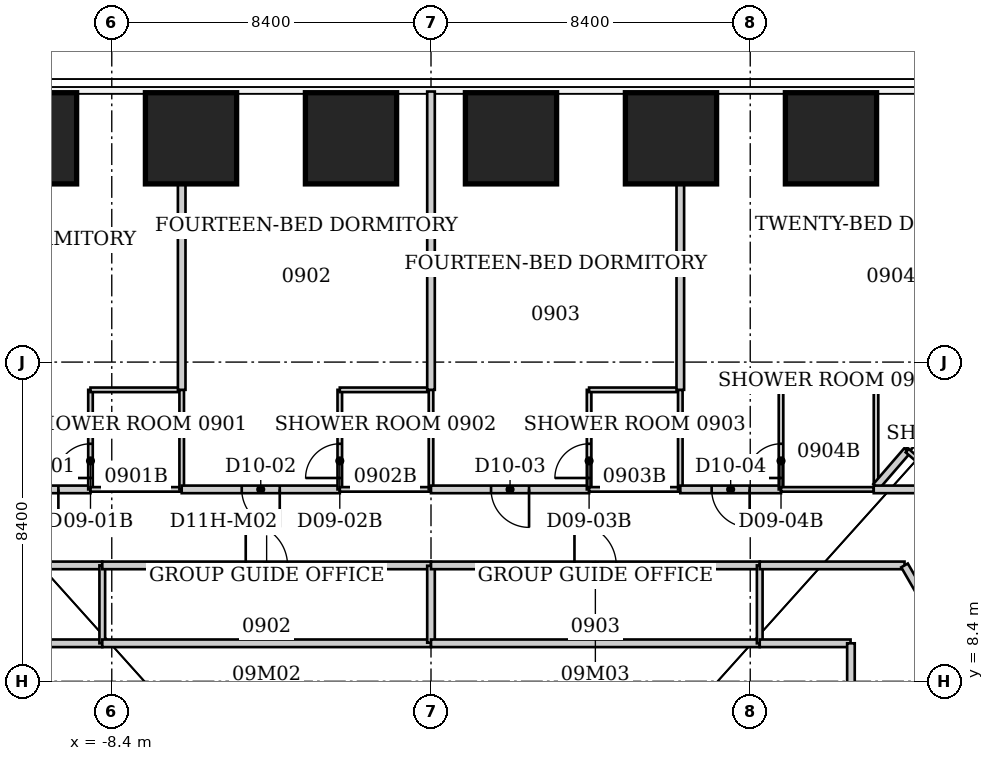
"""IFC4 building model, lengths in metres.
Left out: names, types, materials, properties, quantities, classifications, styles, units other than length and angle.
Written with IfcOpenShell. Run it as: python <this file> out.ifc"""

import sys

from ifc_helpers import new_model, si_unit, direction, frame, frame_2d, origin, origin_2d, place, context, subcontext, project, spatial, rectangle, extrude, element, fill, save


model = new_model("IFC4")
c1 = context("Model", 3, precision=1e-05, world=origin(), true_north=direction((0.0, 1.0)))
c2 = subcontext(c1, "Body", "Model", "MODEL_VIEW")
j1 = project(units=[si_unit("LENGTHUNIT", "METRE"), si_unit("PLANEANGLEUNIT", "RADIAN")], contexts=[c1])
p1 = place(None, origin())
s1 = spatial("IfcSite", under=j1, at=p1, CompositionType="ELEMENT")
p2 = place(p1, origin())
s2 = spatial("IfcBuilding", under=s1, at=p2, CompositionType="ELEMENT")
p3 = place(p2, frame((0.0, 0.0, 42.0)))
s3 = spatial("IfcBuildingStorey", under=s2, at=p3, CompositionType="ELEMENT", Elevation=42.0)
for number, where, z_axis, x_axis in (
    (1, (-10.525, 22.689, 0.0), (0.0, 0.0, 1.0), (0.0, 1.0, 0.0)),
    (2, (-6.315, 22.689, 0.0), (0.0, 0.0, 1.0), (0.0, 1.0, 0.0)),
    (3, (-2.105, 22.689, 0.0), (0.0, 0.0, 1.0), (0.0, 1.0, 0.0)),
    (4, (2.105, 22.689, 0.0), (0.0, 0.0, 1.0), (0.0, 1.0, 0.0)),
    (5, (6.315, 22.689, 0.0), (0.0, 0.0, 1.0), (0.0, 1.0, 0.0)),
    (6, (10.525, 22.689, 0.0), (0.0, 0.0, 1.0), (0.0, 1.0, 0.0)),
):
    element("IfcColumn", number, at=place(p3, frame(where, z_axis=z_axis, x_axis=x_axis)), inside=s3, PredefinedType="COLUMN", context=c2, shape_type="SweptSolid", body=[
        extrude(rectangle(XDim=2.4, YDim=2.4, at=origin_2d()), origin(), (0.0, 0.0, 1.0), 3.8),
    ])
p4 = place(p3, frame((-12.46, 11.45, 0.0), z_axis=(0.0, 0.0, 1.0), x_axis=(1.0, 0.0, 0.0)))
e7 = element("IfcWall", 7, at=p4, inside=s3, PredefinedType="PARTITIONING", context=c2, shape_type="SweptSolid", body=[
    extrude(rectangle(XDim=3.81, YDim=0.2, at=frame_2d((1.905, 0.0))), origin(), (0.0, 0.0, 1.0), 3.64),
])
p5 = place(p3, frame((-8.96, 13.45, 0.0), z_axis=(0.0, 0.0, 1.0), x_axis=(-1.0, 0.0, 0.0)))
e8 = element("IfcWall", 8, at=p5, inside=s3, PredefinedType="PARTITIONING", context=c2, shape_type="SweptSolid", body=[
    extrude(rectangle(XDim=2.69, YDim=0.2, at=frame_2d((1.345, 0.0))), origin(), (0.0, 0.0, 1.0), 3.64),
])
p6 = place(p5, frame((0.845, 0.0, 0.0)))
e9 = element("IfcOpeningElement", 9, at=p6, cuts=e8, PredefinedType="OPENING", context=c2, shape_type="SweptSolid", body=[
    extrude(rectangle(XDim=1.0, YDim=2.13, at=frame_2d((0.5, 1.065))), frame((0.0, 0.1, 0.0), z_axis=(0.0, -1.0, 0.0), x_axis=(1.0, 0.0, 0.0)), (0.0, 0.0, 1.0), 0.2),
])
p7 = place(p3, frame((-8.96, 16.07, 0.0), z_axis=(0.0, 0.0, 1.0), x_axis=(0.0, -1.0, 0.0)))
e10 = element("IfcWall", 10, at=p7, inside=s3, PredefinedType="PARTITIONING", context=c2, shape_type="SweptSolid", body=[
    extrude(rectangle(XDim=2.62, YDim=0.12, at=frame_2d((1.31, 0.0))), origin(), (0.0, 0.0, 1.0), 3.64),
])
p8 = place(p7, frame((1.42, 0.0, 0.0)))
e11 = element("IfcOpeningElement", 11, at=p8, cuts=e10, PredefinedType="OPENING", context=c2, shape_type="SweptSolid", body=[
    extrude(rectangle(XDim=0.9, YDim=2.03, at=frame_2d((0.45, 1.015))), frame((0.0, 0.06, 0.0), z_axis=(0.0, -1.0, 0.0), x_axis=(1.0, 0.0, 0.0)), (0.0, 0.0, 1.0), 0.12),
])
p9 = place(p3, frame((-8.65, 9.4, 0.0), z_axis=(0.0, 0.0, 1.0), x_axis=(-1.0, 0.0, 0.0)))
e12 = element("IfcWall", 12, at=p9, inside=s3, PredefinedType="PARTITIONING", context=c2, shape_type="SweptSolid", body=[
    extrude(rectangle(XDim=2.39, YDim=0.2, at=frame_2d((1.195, 0.0))), origin(), (0.0, 0.0, 1.0), 3.64),
])
p10 = place(p3, frame((-8.65, 11.45, 0.0), z_axis=(0.0, 0.0, 1.0), x_axis=(0.0, -1.0, 0.0)))
e13 = element("IfcWall", 13, at=p10, inside=s3, PredefinedType="PARTITIONING", context=c2, shape_type="SweptSolid", body=[
    extrude(rectangle(XDim=2.05, YDim=0.15, at=frame_2d((1.025, 0.0))), origin(), (0.0, 0.0, 1.0), 3.64),
])
p11 = place(p3, frame((-8.65, 11.45, 0.0), z_axis=(0.0, 0.0, 1.0), x_axis=(1.0, 0.0, 0.0)))
e14 = element("IfcWall", 14, at=p11, inside=s3, PredefinedType="PARTITIONING", context=c2, shape_type="SweptSolid", body=[
    extrude(rectangle(XDim=8.65, YDim=0.2, at=frame_2d((4.325, 0.0))), origin(), (0.0, 0.0, 1.0), 3.64),
])
p12 = place(p11, frame((3.775, 0.0, 0.0)))
e15 = element("IfcOpeningElement", 15, at=p12, cuts=e14, PredefinedType="OPENING", context=c2, shape_type="SweptSolid", body=[
    extrude(rectangle(XDim=1.1, YDim=2.2, at=frame_2d((0.55, 1.1))), frame((0.0, 0.1, 0.0), z_axis=(0.0, -1.0, 0.0), x_axis=(1.0, 0.0, 0.0)), (0.0, 0.0, 1.0), 0.2),
])
for number, where, z_axis, x_axis in (
    (16, (-6.56, 13.45, 0.0), (0.0, 0.0, 1.0), (-1.0, 0.0, 0.0)),
    (17, (-6.56, 16.07, 0.0), (0.0, 0.0, 1.0), (-1.0, 0.0, 0.0)),
):
    element("IfcWall", number, at=place(p3, frame(where, z_axis=z_axis, x_axis=x_axis)), inside=s3, PredefinedType="PARTITIONING", context=c2, shape_type="SweptSolid", body=[
        extrude(rectangle(XDim=2.4, YDim=0.12, at=frame_2d((1.2, 0.0))), origin(), (0.0, 0.0, 1.0), 3.64),
    ])
p13 = place(p3, frame((-6.56, 16.07, 0.0), z_axis=(0.0, 0.0, 1.0), x_axis=(0.0, -1.0, 0.0)))
e18 = element("IfcWall", 18, at=p13, inside=s3, PredefinedType="PARTITIONING", context=c2, shape_type="SweptSolid", body=[
    extrude(rectangle(XDim=2.62, YDim=0.12, at=frame_2d((1.31, 0.0))), origin(), (0.0, 0.0, 1.0), 3.64),
])
p14 = place(p3, frame((-6.56, 23.83, 0.0), z_axis=(0.0, 0.0, 1.0), x_axis=(0.0, -1.0, 0.0)))
e19 = element("IfcWall", 19, at=p14, inside=s3, PredefinedType="PARTITIONING", context=c2, shape_type="SweptSolid", body=[
    extrude(rectangle(XDim=7.76, YDim=0.2, at=frame_2d((3.88, 0.0))), origin(), (0.0, 0.0, 1.0), 3.64),
])
p15 = place(p3, frame((-2.4, 13.45, 0.0), z_axis=(0.0, 0.0, 1.0), x_axis=(-1.0, 0.0, 0.0)))
e20 = element("IfcWall", 20, at=p15, inside=s3, PredefinedType="PARTITIONING", context=c2, shape_type="SweptSolid", body=[
    extrude(rectangle(XDim=4.16, YDim=0.2, at=frame_2d((2.08, 0.0))), origin(), (0.0, 0.0, 1.0), 3.64),
])
p16 = place(p15, frame((1.58, 0.0, 0.0)))
e21 = element("IfcOpeningElement", 21, at=p16, cuts=e20, PredefinedType="OPENING", context=c2, shape_type="SweptSolid", body=[
    extrude(rectangle(XDim=1.0, YDim=2.13, at=frame_2d((0.5, 1.065))), frame((0.0, 0.1, 0.0), z_axis=(0.0, -1.0, 0.0), x_axis=(1.0, 0.0, 0.0)), (0.0, 0.0, 1.0), 0.2),
])
p17 = place(p3, frame((-2.4, 16.07, 0.0), z_axis=(0.0, 0.0, 1.0), x_axis=(0.0, -1.0, 0.0)))
e22 = element("IfcWall", 22, at=p17, inside=s3, PredefinedType="PARTITIONING", context=c2, shape_type="SweptSolid", body=[
    extrude(rectangle(XDim=2.62, YDim=0.12, at=frame_2d((1.31, 0.0))), origin(), (0.0, 0.0, 1.0), 3.64),
])
p18 = place(p17, frame((1.42, 0.0, 0.0)))
e23 = element("IfcOpeningElement", 23, at=p18, cuts=e22, PredefinedType="OPENING", context=c2, shape_type="SweptSolid", body=[
    extrude(rectangle(XDim=0.9, YDim=2.03, at=frame_2d((0.45, 1.015))), frame((0.0, 0.06, 0.0), z_axis=(0.0, -1.0, 0.0), x_axis=(1.0, 0.0, 0.0)), (0.0, 0.0, 1.0), 0.12),
])
p19 = place(p3, frame((0.0, 9.4, 0.0), z_axis=(0.0, 0.0, 1.0), x_axis=(-1.0, 0.0, 0.0)))
e24 = element("IfcWall", 24, at=p19, inside=s3, PredefinedType="PARTITIONING", context=c2, shape_type="SweptSolid", body=[
    extrude(rectangle(XDim=8.65, YDim=0.2, at=frame_2d((4.325, 0.0))), origin(), (0.0, 0.0, 1.0), 3.64),
])
p20 = place(p3, frame((0.0, 11.44, 0.0), z_axis=(0.0, 0.0, 1.0), x_axis=(0.0, -1.0, 0.0)))
e25 = element("IfcWall", 25, at=p20, inside=s3, PredefinedType="PARTITIONING", context=c2, shape_type="SweptSolid", body=[
    extrude(rectangle(XDim=2.025, YDim=0.2, at=frame_2d((1.012, 0.0))), origin(), (0.0, 0.0, 1.0), 2.878),
])
p21 = place(p3, frame((0.0, 11.45, 0.0), z_axis=(0.0, 0.0, 1.0), x_axis=(1.0, 0.0, 0.0)))
e26 = element("IfcWall", 26, at=p21, inside=s3, PredefinedType="PARTITIONING", context=c2, shape_type="SweptSolid", body=[
    extrude(rectangle(XDim=8.65, YDim=0.2, at=frame_2d((4.325, 0.0))), origin(), (0.0, 0.0, 1.0), 3.64),
])
p22 = place(p21, frame((3.775, 0.0, 0.0)))
e27 = element("IfcOpeningElement", 27, at=p22, cuts=e26, PredefinedType="OPENING", context=c2, shape_type="SweptSolid", body=[
    extrude(rectangle(XDim=1.1, YDim=2.2, at=frame_2d((0.55, 1.1))), frame((0.0, 0.1, 0.0), z_axis=(0.0, -1.0, 0.0), x_axis=(1.0, 0.0, 0.0)), (0.0, 0.0, 1.0), 0.2),
])
for number, where, z_axis, x_axis in (
    (28, (0.0, 13.45, 0.0), (0.0, 0.0, 1.0), (-1.0, 0.0, 0.0)),
    (29, (0.0, 16.07, 0.0), (0.0, 0.0, 1.0), (-1.0, 0.0, 0.0)),
):
    element("IfcWall", number, at=place(p3, frame(where, z_axis=z_axis, x_axis=x_axis)), inside=s3, PredefinedType="PARTITIONING", context=c2, shape_type="SweptSolid", body=[
        extrude(rectangle(XDim=2.4, YDim=0.12, at=frame_2d((1.2, 0.0))), origin(), (0.0, 0.0, 1.0), 3.64),
    ])
p23 = place(p3, frame((0.0, 16.07, 0.0), z_axis=(0.0, 0.0, 1.0), x_axis=(0.0, -1.0, 0.0)))
e30 = element("IfcWall", 30, at=p23, inside=s3, PredefinedType="PARTITIONING", context=c2, shape_type="SweptSolid", body=[
    extrude(rectangle(XDim=2.62, YDim=0.12, at=frame_2d((1.31, 0.0))), origin(), (0.0, 0.0, 1.0), 2.878),
])
p24 = place(p3, frame((0.0, 23.92, 0.0), z_axis=(0.0, 0.0, 1.0), x_axis=(0.0, -1.0, 0.0)))
e31 = element("IfcWall", 31, at=p24, inside=s3, PredefinedType="PARTITIONING", context=c2, shape_type="SweptSolid", body=[
    extrude(rectangle(XDim=7.85, YDim=0.2, at=frame_2d((3.925, 0.0))), origin(), (0.0, 0.0, 1.0), 2.878),
])
p25 = place(p3, frame((4.16, 13.45, 0.0), z_axis=(0.0, 0.0, 1.0), x_axis=(-1.0, 0.0, 0.0)))
e32 = element("IfcWall", 32, at=p25, inside=s3, PredefinedType="PARTITIONING", context=c2, shape_type="SweptSolid", body=[
    extrude(rectangle(XDim=4.16, YDim=0.2, at=frame_2d((2.08, 0.0))), origin(), (0.0, 0.0, 1.0), 3.64),
])
p26 = place(p25, frame((1.58, 0.0, 0.0)))
e33 = element("IfcOpeningElement", 33, at=p26, cuts=e32, PredefinedType="OPENING", context=c2, shape_type="SweptSolid", body=[
    extrude(rectangle(XDim=1.0, YDim=2.13, at=frame_2d((0.5, 1.065))), frame((0.0, 0.1, 0.0), z_axis=(0.0, -1.0, 0.0), x_axis=(1.0, 0.0, 0.0)), (0.0, 0.0, 1.0), 0.2),
])
p27 = place(p3, frame((4.16, 16.07, 0.0), z_axis=(0.0, 0.0, 1.0), x_axis=(0.0, -1.0, 0.0)))
e34 = element("IfcWall", 34, at=p27, inside=s3, PredefinedType="PARTITIONING", context=c2, shape_type="SweptSolid", body=[
    extrude(rectangle(XDim=2.62, YDim=0.12, at=frame_2d((1.31, 0.0))), origin(), (0.0, 0.0, 1.0), 2.878),
])
p28 = place(p27, frame((1.42, 0.0, 0.0)))
e35 = element("IfcOpeningElement", 35, at=p28, cuts=e34, PredefinedType="OPENING", context=c2, shape_type="SweptSolid", body=[
    extrude(rectangle(XDim=0.9, YDim=2.03, at=frame_2d((0.45, 1.015))), frame((0.0, 0.06, 0.0), z_axis=(0.0, -1.0, 0.0), x_axis=(1.0, 0.0, 0.0)), (0.0, 0.0, 1.0), 0.12),
])
for number, where, z_axis, x_axis in (
    (36, (6.56, 13.45, 0.0), (0.0, 0.0, 1.0), (-1.0, 0.0, 0.0)),
    (37, (6.56, 16.07, 0.0), (0.0, 0.0, 1.0), (-1.0, 0.0, 0.0)),
):
    element("IfcWall", number, at=place(p3, frame(where, z_axis=z_axis, x_axis=x_axis)), inside=s3, PredefinedType="PARTITIONING", context=c2, shape_type="SweptSolid", body=[
        extrude(rectangle(XDim=2.4, YDim=0.12, at=frame_2d((1.2, 0.0))), origin(), (0.0, 0.0, 1.0), 3.64),
    ])
p29 = place(p3, frame((6.56, 16.07, 0.0), z_axis=(0.0, 0.0, 1.0), x_axis=(0.0, -1.0, 0.0)))
e38 = element("IfcWall", 38, at=p29, inside=s3, PredefinedType="PARTITIONING", context=c2, shape_type="SweptSolid", body=[
    extrude(rectangle(XDim=2.62, YDim=0.12, at=frame_2d((1.31, 0.0))), origin(), (0.0, 0.0, 1.0), 3.64),
])
p30 = place(p3, frame((6.56, 23.83, 0.0), z_axis=(0.0, 0.0, 1.0), x_axis=(0.0, -1.0, 0.0)))
e39 = element("IfcWall", 39, at=p30, inside=s3, PredefinedType="PARTITIONING", context=c2, shape_type="SweptSolid", body=[
    extrude(rectangle(XDim=7.76, YDim=0.2, at=frame_2d((3.88, 0.0))), origin(), (0.0, 0.0, 1.0), 3.64),
])
p31 = place(p3, frame((8.65, 9.4, 0.0), z_axis=(0.0, 0.0, 1.0), x_axis=(-1.0, 0.0, 0.0)))
e40 = element("IfcWall", 40, at=p31, inside=s3, PredefinedType="PARTITIONING", context=c2, shape_type="SweptSolid", body=[
    extrude(rectangle(XDim=8.65, YDim=0.2, at=frame_2d((4.325, 0.0))), origin(), (0.0, 0.0, 1.0), 3.64),
])
p32 = place(p3, frame((8.65, 11.45, 0.0), z_axis=(0.0, 0.0, 1.0), x_axis=(0.0, -1.0, 0.0)))
e41 = element("IfcWall", 41, at=p32, inside=s3, PredefinedType="PARTITIONING", context=c2, shape_type="SweptSolid", body=[
    extrude(rectangle(XDim=2.05, YDim=0.15, at=frame_2d((1.025, 0.0))), origin(), (0.0, 0.0, 1.0), 3.64),
])
p33 = place(p3, frame((8.65, 11.45, 0.0), z_axis=(0.0, 0.0, 1.0), x_axis=(1.0, 0.0, 0.0)))
e42 = element("IfcWall", 42, at=p33, inside=s3, PredefinedType="PARTITIONING", context=c2, shape_type="SweptSolid", body=[
    extrude(rectangle(XDim=3.81, YDim=0.2, at=frame_2d((1.905, 0.0))), origin(), (0.0, 0.0, 1.0), 3.64),
])
p34 = place(p3, frame((9.21, 13.45, 0.0), z_axis=(0.0, 0.0, 1.0), x_axis=(-1.0, 0.0, 0.0)))
e43 = element("IfcWall", 43, at=p34, inside=s3, PredefinedType="PARTITIONING", context=c2, shape_type="SweptSolid", body=[
    extrude(rectangle(XDim=2.65, YDim=0.2, at=frame_2d((1.325, 0.0))), origin(), (0.0, 0.0, 1.0), 3.64),
])
p35 = place(p34, frame((0.825, 0.0, 0.0)))
e44 = element("IfcOpeningElement", 44, at=p35, cuts=e43, PredefinedType="OPENING", context=c2, shape_type="SweptSolid", body=[
    extrude(rectangle(XDim=1.0, YDim=2.13, at=frame_2d((0.5, 1.065))), frame((0.0, 0.1, 0.0), z_axis=(0.0, -1.0, 0.0), x_axis=(1.0, 0.0, 0.0)), (0.0, 0.0, 1.0), 0.2),
])
p36 = place(p3, frame((9.21, 16.12, 0.0), z_axis=(0.0, 0.0, 1.0), x_axis=(0.0, -1.0, 0.0)))
e45 = element("IfcWall", 45, at=p36, inside=s3, PredefinedType="PARTITIONING", context=c2, shape_type="SweptSolid", body=[
    extrude(rectangle(XDim=2.67, YDim=0.12, at=frame_2d((1.335, 0.0))), origin(), (0.0, 0.0, 1.0), 3.64),
])
p37 = place(p36, frame((1.47, 0.0, 0.0)))
e46 = element("IfcOpeningElement", 46, at=p37, cuts=e45, PredefinedType="OPENING", context=c2, shape_type="SweptSolid", body=[
    extrude(rectangle(XDim=0.9, YDim=2.03, at=frame_2d((0.45, 1.015))), frame((0.0, 0.06, 0.0), z_axis=(0.0, -1.0, 0.0), x_axis=(1.0, 0.0, 0.0)), (0.0, 0.0, 1.0), 0.12),
])
p38 = place(p3, frame((11.04, 9.4, 0.0), z_axis=(0.0, 0.0, 1.0), x_axis=(-1.0, 0.0, 0.0)))
e47 = element("IfcWall", 47, at=p38, inside=s3, PredefinedType="PARTITIONING", context=c2, shape_type="SweptSolid", body=[
    extrude(rectangle(XDim=2.39, YDim=0.2, at=frame_2d((1.195, 0.0))), origin(), (0.0, 0.0, 1.0), 3.64),
])
p39 = place(p3, frame((11.05, -7.76, 0.0), z_axis=(0.0, 0.0, 1.0), x_axis=(0.0, 1.0, 0.0)))
e48 = element("IfcWall", 48, at=p39, inside=s3, PredefinedType="PARTITIONING", context=c2, shape_type="SweptSolid", body=[
    extrude(rectangle(XDim=17.16, YDim=0.2, at=frame_2d((8.58, 0.0))), origin(), (0.0, 0.0, 1.0), 3.64),
])
p40 = place(p39, frame((8.03, 0.0, 0.0)))
e49 = element("IfcOpeningElement", 49, at=p40, cuts=e48, PredefinedType="OPENING", context=c2, shape_type="SweptSolid", body=[
    extrude(rectangle(XDim=1.1, YDim=2.2, at=frame_2d((0.55, 1.1))), frame((0.0, 0.1, 0.0), z_axis=(0.0, -1.0, 0.0), x_axis=(1.0, 0.0, 0.0)), (0.0, 0.0, 1.0), 0.2),
])
p41 = place(p3, frame((11.65, 13.45, 0.0), z_axis=(0.0, 0.0, 1.0), x_axis=(-1.0, 0.0, 0.0)))
e50 = element("IfcWall", 50, at=p41, inside=s3, PredefinedType="PARTITIONING", context=c2, shape_type="SweptSolid", body=[
    extrude(rectangle(XDim=2.44, YDim=0.12, at=frame_2d((1.22, 0.0))), origin(), (0.0, 0.0, 1.0), 3.64),
])
p42 = place(p3, frame((11.71, 13.605, 0.0), z_axis=(0.0, 0.0, 1.0), x_axis=(0.0, 1.0, 0.0)))
e51 = element("IfcWall", 51, at=p42, inside=s3, PredefinedType="PARTITIONING", context=c2, shape_type="SweptSolid", body=[
    extrude(rectangle(XDim=2.515, YDim=0.12, at=frame_2d((1.258, 0.0))), origin(), (0.0, 0.0, 1.0), 3.64),
])
p43 = place(p3, frame((11.71, 16.12, 0.0), z_axis=(0.0, 0.0, 1.0), x_axis=(-1.0, 0.0, 0.0)))
e52 = element("IfcWall", 52, at=p43, inside=s3, PredefinedType="PARTITIONING", context=c2, shape_type="SweptSolid", body=[
    extrude(rectangle(XDim=2.5, YDim=0.12, at=frame_2d((1.25, 0.0))), origin(), (0.0, 0.0, 1.0), 3.64),
])
p44 = place(p3, frame((11.715, 13.526, 0.0), z_axis=(0.0, 0.0, 1.0), x_axis=(0.653334457224, 0.757069406993, 0.0)))
e53 = element("IfcWall", 53, at=p44, inside=s3, PredefinedType="PARTITIONING", context=c2, shape_type="SweptSolid", body=[
    extrude(rectangle(XDim=1.247, YDim=0.2, at=frame_2d((0.624, 0.0))), origin(), (0.0, 0.0, 1.0), 3.64),
])
p45 = place(p3, frame((12.46, 11.45, 0.0), z_axis=(0.0, 0.0, 1.0), x_axis=(0.499704269421, -0.866196076603, 0.0)))
e54 = element("IfcWall", 54, at=p45, inside=s3, PredefinedType="PARTITIONING", context=c2, shape_type="SweptSolid", body=[
    extrude(rectangle(XDim=9.686, YDim=0.2, at=frame_2d((4.843, 0.0))), origin(), (0.0, 0.0, 1.0), 3.64),
])
p46 = place(p3, frame((12.53, 14.47, 0.0), z_axis=(0.0, 0.0, 1.0), x_axis=(0.655194291402, 0.755460416245, 0.0)))
e55 = element("IfcWall", 55, at=p46, inside=s3, PredefinedType="PARTITIONING", context=c2, shape_type="SweptSolid", body=[
    extrude(rectangle(XDim=2.396, YDim=0.12, at=frame_2d((1.198, 0.0))), origin(), (0.0, 0.0, 1.0), 3.64),
])
p47 = place(p3, frame((12.53, 14.47, 0.0), z_axis=(0.0, 0.0, 1.0), x_axis=(0.757086659925, -0.653314464377, 0.0)))
e56 = element("IfcWall", 56, at=p47, inside=s3, PredefinedType="PARTITIONING", context=c2, shape_type="SweptSolid", body=[
    extrude(rectangle(XDim=2.602, YDim=0.12, at=frame_2d((1.301, 0.0))), origin(), (0.0, 0.0, 1.0), 3.64),
])
p48 = place(p3, frame((13.505, 13.45, 0.0), z_axis=(0.0, 0.0, 1.0), x_axis=(-1.0, 0.0, 0.0)))
e57 = element("IfcWall", 57, at=p48, inside=s3, PredefinedType="PARTITIONING", context=c2, shape_type="SweptSolid", body=[
    extrude(rectangle(XDim=1.855, YDim=0.2, at=frame_2d((0.927, 0.0))), origin(), (0.0, 0.0, 1.0), 3.64),
])
p49 = place(p6, origin())
e58 = element("IfcDoor", 58, at=p49, inside=s3, OperationType="SINGLE_SWING_LEFT", PredefinedType="DOOR", context=c2, shape_type="SweptSolid", body=[
    extrude(rectangle(XDim=1.0, YDim=2.13, at=frame_2d((0.5, 1.065))), frame((0.0, 0.025, 0.0), z_axis=(0.0, -1.0, 0.0), x_axis=(1.0, 0.0, 0.0)), (0.0, 0.0, 1.0), 0.05),
])
fill(e9, e58)
p50 = place(p8, origin())
e59 = element("IfcDoor", 59, at=p50, inside=s3, OperationType="SINGLE_SWING_RIGHT", PredefinedType="DOOR", context=c2, shape_type="SweptSolid", body=[
    extrude(rectangle(XDim=0.9, YDim=2.03, at=frame_2d((0.45, 1.015))), frame((0.0, 0.025, 0.0), z_axis=(0.0, -1.0, 0.0), x_axis=(1.0, 0.0, 0.0)), (0.0, 0.0, 1.0), 0.05),
])
fill(e11, e59)
p51 = place(p16, origin())
e60 = element("IfcDoor", 60, at=p51, inside=s3, OperationType="SINGLE_SWING_LEFT", PredefinedType="DOOR", context=c2, shape_type="SweptSolid", body=[
    extrude(rectangle(XDim=1.0, YDim=2.13, at=frame_2d((0.5, 1.065))), frame((0.0, 0.025, 0.0), z_axis=(0.0, -1.0, 0.0), x_axis=(1.0, 0.0, 0.0)), (0.0, 0.0, 1.0), 0.05),
])
fill(e21, e60)
p52 = place(p18, origin())
e61 = element("IfcDoor", 61, at=p52, inside=s3, OperationType="SINGLE_SWING_RIGHT", PredefinedType="DOOR", context=c2, shape_type="SweptSolid", body=[
    extrude(rectangle(XDim=0.9, YDim=2.03, at=frame_2d((0.45, 1.015))), frame((0.0, 0.025, 0.0), z_axis=(0.0, -1.0, 0.0), x_axis=(1.0, 0.0, 0.0)), (0.0, 0.0, 1.0), 0.05),
])
fill(e23, e61)
p53 = place(p26, origin())
e62 = element("IfcDoor", 62, at=p53, inside=s3, OperationType="SINGLE_SWING_LEFT", PredefinedType="DOOR", context=c2, shape_type="SweptSolid", body=[
    extrude(rectangle(XDim=1.0, YDim=2.13, at=frame_2d((0.5, 1.065))), frame((0.0, 0.025, 0.0), z_axis=(0.0, -1.0, 0.0), x_axis=(1.0, 0.0, 0.0)), (0.0, 0.0, 1.0), 0.05),
])
fill(e33, e62)
p54 = place(p28, origin())
e63 = element("IfcDoor", 63, at=p54, inside=s3, OperationType="SINGLE_SWING_RIGHT", PredefinedType="DOOR", context=c2, shape_type="SweptSolid", body=[
    extrude(rectangle(XDim=0.9, YDim=2.03, at=frame_2d((0.45, 1.015))), frame((0.0, 0.025, 0.0), z_axis=(0.0, -1.0, 0.0), x_axis=(1.0, 0.0, 0.0)), (0.0, 0.0, 1.0), 0.05),
])
fill(e35, e63)
p55 = place(p35, origin())
e64 = element("IfcDoor", 64, at=p55, inside=s3, OperationType="SINGLE_SWING_LEFT", PredefinedType="DOOR", context=c2, shape_type="SweptSolid", body=[
    extrude(rectangle(XDim=1.0, YDim=2.13, at=frame_2d((0.5, 1.065))), frame((0.0, 0.025, 0.0), z_axis=(0.0, -1.0, 0.0), x_axis=(1.0, 0.0, 0.0)), (0.0, 0.0, 1.0), 0.05),
])
fill(e44, e64)
p56 = place(p37, origin())
e65 = element("IfcDoor", 65, at=p56, inside=s3, OperationType="SINGLE_SWING_RIGHT", PredefinedType="DOOR", context=c2, shape_type="SweptSolid", body=[
    extrude(rectangle(XDim=0.9, YDim=2.03, at=frame_2d((0.45, 1.015))), frame((0.0, 0.025, 0.0), z_axis=(0.0, -1.0, 0.0), x_axis=(1.0, 0.0, 0.0)), (0.0, 0.0, 1.0), 0.05),
])
fill(e46, e65)
p57 = place(p12, origin())
e66 = element("IfcDoor", 66, at=p57, inside=s3, OperationType="SINGLE_SWING_LEFT", PredefinedType="DOOR", context=c2, shape_type="SweptSolid", body=[
    extrude(rectangle(XDim=1.1, YDim=2.2, at=frame_2d((0.55, 1.1))), frame((0.0, 0.025, 0.0), z_axis=(0.0, -1.0, 0.0), x_axis=(1.0, 0.0, 0.0)), (0.0, 0.0, 1.0), 0.05),
])
fill(e15, e66)
p58 = place(p22, origin())
e67 = element("IfcDoor", 67, at=p58, inside=s3, OperationType="SINGLE_SWING_LEFT", PredefinedType="DOOR", context=c2, shape_type="SweptSolid", body=[
    extrude(rectangle(XDim=1.1, YDim=2.2, at=frame_2d((0.55, 1.1))), frame((0.0, 0.025, 0.0), z_axis=(0.0, -1.0, 0.0), x_axis=(1.0, 0.0, 0.0)), (0.0, 0.0, 1.0), 0.05),
])
fill(e27, e67)
save(model, sys.argv[1])
